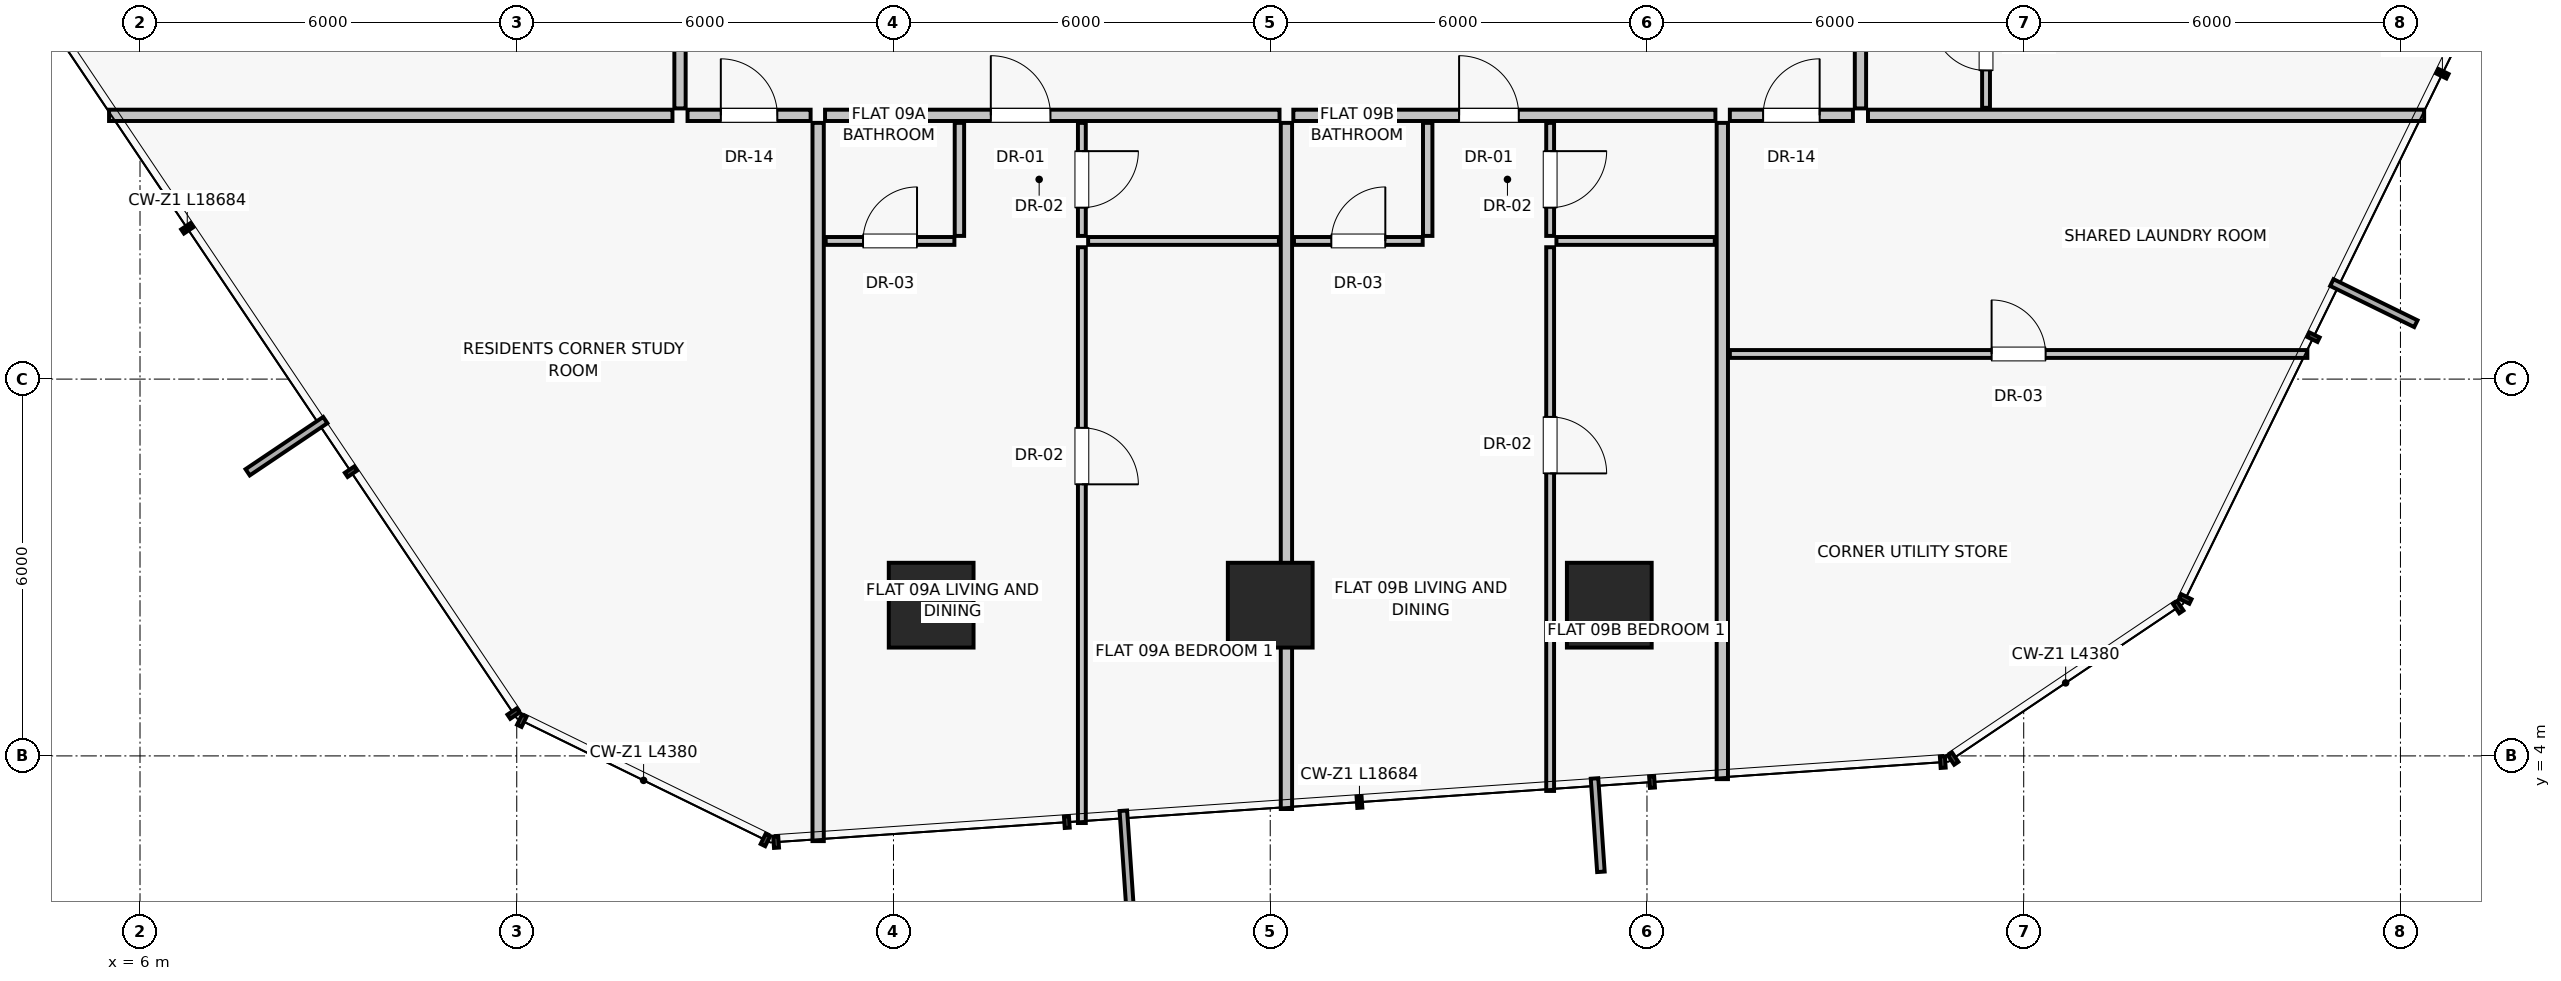
"""IFC4 building model, lengths in metres.
Left out: names, types, materials, properties, quantities, classifications, styles, units other than length and angle.
Written with IfcOpenShell. Run it as: python <this file> out.ifc"""

import sys

from ifc_helpers import new_model, si_unit, direction, frame, frame_2d, origin, origin_2d, place, context, subcontext, project, spatial, rectangle, extrude, source, transform, mapped, element, fill, save


model = new_model("IFC4")
c1 = context("Model", 3, precision=1e-05, world=origin(), true_north=direction((0.0, 1.0)))
c2 = subcontext(c1, "Body", "Model", "MODEL_VIEW")
j1 = project(units=[si_unit("LENGTHUNIT", "METRE"), si_unit("PLANEANGLEUNIT", "RADIAN")], contexts=[c1])
p1 = place(None, origin())
s1 = spatial("IfcSite", under=j1, at=p1, CompositionType="ELEMENT")
p2 = place(p1, origin())
s2 = spatial("IfcBuilding", under=s1, at=p2, CompositionType="ELEMENT")
p3 = place(p2, frame((0.0, 0.0, 37.05)))
s3 = spatial("IfcBuildingStorey", under=s2, at=p3, CompositionType="ELEMENT", Elevation=37.05)
for number, where, z_axis, x_axis in (
    (1, (18.6, 6.4, 0.0), (0.0, 0.0, 1.0), (1.0, 0.0, 0.0)),
    (2, (24.0, 6.4, 0.0), (0.0, 0.0, 1.0), (1.0, 0.0, 0.0)),
    (3, (29.4, 6.4, 0.0), (0.0, 0.0, 1.0), (1.0, 0.0, 0.0)),
):
    element("IfcColumn", number, at=place(p3, frame(where, z_axis=z_axis, x_axis=x_axis)), inside=s3, PredefinedType="COLUMN", context=c2, shape_type="SweptSolid", body=[
        extrude(rectangle(XDim=1.35, YDim=1.35, at=origin_2d()), origin(), (0.0, 0.0, 1.0), 3.25),
    ])
p4 = place(p3, frame((16.8, 14.08, 0.0), z_axis=(0.0, 0.0, 1.0), x_axis=(0.0, -1.0, 0.0)))
e4 = element("IfcWall", 4, at=p4, inside=s3, PredefinedType="PARTITIONING", context=c2, shape_type="SweptSolid", body=[
    extrude(rectangle(XDim=11.437, YDim=0.18, at=frame_2d((5.718, 0.0))), origin(), (0.0, 0.0, 1.0), 3.0),
])
p5 = place(p3, frame((31.2, 14.08, 0.0), z_axis=(0.0, 0.0, 1.0), x_axis=(0.0, -1.0, 0.0)))
e5 = element("IfcWall", 5, at=p5, inside=s3, PredefinedType="PARTITIONING", context=c2, shape_type="SweptSolid", body=[
    extrude(rectangle(XDim=10.45, YDim=0.18, at=frame_2d((5.225, 0.0))), origin(), (0.0, 0.0, 1.0), 3.0),
])
p6 = place(p3, frame((16.91, 14.2, 0.0), z_axis=(0.0, 0.0, 1.0), x_axis=(1.0, 0.0, 0.0)))
e6 = element("IfcWall", 6, at=p6, inside=s3, PredefinedType="PARTITIONING", context=c2, shape_type="SweptSolid", body=[
    extrude(rectangle(XDim=7.238, YDim=0.18, at=frame_2d((3.619, 0.0))), origin(), (0.0, 0.0, 1.0), 3.0),
])
p7 = place(p6, frame((2.64, 0.0, 0.0)))
e7 = element("IfcOpeningElement", 7, at=p7, cuts=e6, PredefinedType="OPENING", context=c2, shape_type="SweptSolid", body=[
    extrude(rectangle(XDim=0.95, YDim=2.02, at=frame_2d((0.475, 1.01))), frame((0.0, 0.1, 0.0), z_axis=(0.0, -1.0, 0.0), x_axis=(1.0, 0.0, 0.0)), (0.0, 0.0, 1.0), 0.2),
])
p8 = place(p3, frame((19.05, 14.08, 0.0), z_axis=(0.0, 0.0, 1.0), x_axis=(0.0, -1.0, 0.0)))
e8 = element("IfcWall", 8, at=p8, inside=s3, PredefinedType="PARTITIONING", context=c2, shape_type="SweptSolid", body=[
    extrude(rectangle(XDim=1.8, YDim=0.15, at=frame_2d((0.9, 0.0))), origin(), (0.0, 0.0, 1.0), 3.0),
])
p9 = place(p3, frame((16.92, 12.2, 0.0), z_axis=(0.0, 0.0, 1.0), x_axis=(1.0, 0.0, 0.0)))
e9 = element("IfcWall", 9, at=p9, inside=s3, PredefinedType="PARTITIONING", context=c2, shape_type="SweptSolid", body=[
    extrude(rectangle(XDim=2.05, YDim=0.125, at=frame_2d((1.025, 0.0))), origin(), (0.0, 0.0, 1.0), 3.0),
])
p10 = place(p9, frame((0.595, 0.0, 0.0)))
e10 = element("IfcOpeningElement", 10, at=p10, cuts=e9, PredefinedType="OPENING", context=c2, shape_type="SweptSolid", body=[
    extrude(rectangle(XDim=0.86, YDim=2.01, at=frame_2d((0.43, 1.005))), frame((0.0, 0.073, 0.0), z_axis=(0.0, -1.0, 0.0), x_axis=(1.0, 0.0, 0.0)), (0.0, 0.0, 1.0), 0.145),
])
p11 = place(p3, frame((21.0, 14.08, 0.0), z_axis=(0.0, 0.0, 1.0), x_axis=(0.0, -1.0, 0.0)))
e11 = element("IfcWall", 11, at=p11, inside=s3, PredefinedType="PARTITIONING", context=c2, shape_type="SweptSolid", body=[
    extrude(rectangle(XDim=1.8, YDim=0.125, at=frame_2d((0.9, 0.0))), origin(), (0.0, 0.0, 1.0), 3.0),
])
p12 = place(p11, frame((0.45, 0.0, 0.0)))
e12 = element("IfcOpeningElement", 12, at=p12, cuts=e11, PredefinedType="OPENING", context=c2, shape_type="SweptSolid", body=[
    extrude(rectangle(XDim=0.9, YDim=2.01, at=frame_2d((0.45, 1.005))), frame((0.0, 0.073, 0.0), z_axis=(0.0, -1.0, 0.0), x_axis=(1.0, 0.0, 0.0)), (0.0, 0.0, 1.0), 0.145),
])
p13 = place(p3, frame((21.1, 12.2, 0.0), z_axis=(0.0, 0.0, 1.0), x_axis=(1.0, 0.0, 0.0)))
e13 = element("IfcWall", 13, at=p13, inside=s3, PredefinedType="PARTITIONING", context=c2, shape_type="SweptSolid", body=[
    extrude(rectangle(XDim=3.038, YDim=0.125, at=frame_2d((1.519, 0.0))), origin(), (0.0, 0.0, 1.0), 3.0),
])
p14 = place(p3, frame((21.0, 12.1, 0.0), z_axis=(0.0, 0.0, 1.0), x_axis=(0.0, -1.0, 0.0)))
e14 = element("IfcWall", 14, at=p14, inside=s3, PredefinedType="PARTITIONING", context=c2, shape_type="SweptSolid", body=[
    extrude(rectangle(XDim=9.169, YDim=0.125, at=frame_2d((4.584, 0.0))), origin(), (0.0, 0.0, 1.0), 3.0),
])
p15 = place(p14, frame((2.875, 0.0, 0.0)))
e15 = element("IfcOpeningElement", 15, at=p15, cuts=e14, PredefinedType="OPENING", context=c2, shape_type="SweptSolid", body=[
    extrude(rectangle(XDim=0.9, YDim=2.01, at=frame_2d((0.45, 1.005))), frame((0.0, 0.073, 0.0), z_axis=(0.0, -1.0, 0.0), x_axis=(1.0, 0.0, 0.0)), (0.0, 0.0, 1.0), 0.145),
])
p16 = place(p3, frame((24.258, 14.08, 0.0), z_axis=(0.0, 0.0, 1.0), x_axis=(0.0, -1.0, 0.0)))
e16 = element("IfcWall", 16, at=p16, inside=s3, PredefinedType="PARTITIONING", context=c2, shape_type="SweptSolid", body=[
    extrude(rectangle(XDim=10.926, YDim=0.18, at=frame_2d((5.463, 0.0))), origin(), (0.0, 0.0, 1.0), 3.0),
])
p17 = place(p3, frame((24.368, 14.2, 0.0), z_axis=(0.0, 0.0, 1.0), x_axis=(1.0, 0.0, 0.0)))
e17 = element("IfcWall", 17, at=p17, inside=s3, PredefinedType="PARTITIONING", context=c2, shape_type="SweptSolid", body=[
    extrude(rectangle(XDim=6.722, YDim=0.18, at=frame_2d((3.361, 0.0))), origin(), (0.0, 0.0, 1.0), 3.0),
])
p18 = place(p17, frame((2.64, 0.0, 0.0)))
e18 = element("IfcOpeningElement", 18, at=p18, cuts=e17, PredefinedType="OPENING", context=c2, shape_type="SweptSolid", body=[
    extrude(rectangle(XDim=0.95, YDim=2.02, at=frame_2d((0.475, 1.01))), frame((0.0, 0.1, 0.0), z_axis=(0.0, -1.0, 0.0), x_axis=(1.0, 0.0, 0.0)), (0.0, 0.0, 1.0), 0.2),
])
p19 = place(p3, frame((26.508, 14.08, 0.0), z_axis=(0.0, 0.0, 1.0), x_axis=(0.0, -1.0, 0.0)))
e19 = element("IfcWall", 19, at=p19, inside=s3, PredefinedType="PARTITIONING", context=c2, shape_type="SweptSolid", body=[
    extrude(rectangle(XDim=1.8, YDim=0.15, at=frame_2d((0.9, 0.0))), origin(), (0.0, 0.0, 1.0), 3.0),
])
p20 = place(p3, frame((24.378, 12.2, 0.0), z_axis=(0.0, 0.0, 1.0), x_axis=(1.0, 0.0, 0.0)))
e20 = element("IfcWall", 20, at=p20, inside=s3, PredefinedType="PARTITIONING", context=c2, shape_type="SweptSolid", body=[
    extrude(rectangle(XDim=2.05, YDim=0.125, at=frame_2d((1.025, 0.0))), origin(), (0.0, 0.0, 1.0), 3.0),
])
p21 = place(p20, frame((0.595, 0.0, 0.0)))
e21 = element("IfcOpeningElement", 21, at=p21, cuts=e20, PredefinedType="OPENING", context=c2, shape_type="SweptSolid", body=[
    extrude(rectangle(XDim=0.86, YDim=2.01, at=frame_2d((0.43, 1.005))), frame((0.0, 0.073, 0.0), z_axis=(0.0, -1.0, 0.0), x_axis=(1.0, 0.0, 0.0)), (0.0, 0.0, 1.0), 0.145),
])
p22 = place(p3, frame((28.458, 14.08, 0.0), z_axis=(0.0, 0.0, 1.0), x_axis=(0.0, -1.0, 0.0)))
e22 = element("IfcWall", 22, at=p22, inside=s3, PredefinedType="PARTITIONING", context=c2, shape_type="SweptSolid", body=[
    extrude(rectangle(XDim=1.8, YDim=0.125, at=frame_2d((0.9, 0.0))), origin(), (0.0, 0.0, 1.0), 3.0),
])
p23 = place(p22, frame((0.45, 0.0, 0.0)))
e23 = element("IfcOpeningElement", 23, at=p23, cuts=e22, PredefinedType="OPENING", context=c2, shape_type="SweptSolid", body=[
    extrude(rectangle(XDim=0.9, YDim=2.01, at=frame_2d((0.45, 1.005))), frame((0.0, 0.073, 0.0), z_axis=(0.0, -1.0, 0.0), x_axis=(1.0, 0.0, 0.0)), (0.0, 0.0, 1.0), 0.145),
])
p24 = place(p3, frame((28.558, 12.2, 0.0), z_axis=(0.0, 0.0, 1.0), x_axis=(1.0, 0.0, 0.0)))
e24 = element("IfcWall", 24, at=p24, inside=s3, PredefinedType="PARTITIONING", context=c2, shape_type="SweptSolid", body=[
    extrude(rectangle(XDim=2.522, YDim=0.125, at=frame_2d((1.261, 0.0))), origin(), (0.0, 0.0, 1.0), 3.0),
])
p25 = place(p3, frame((28.458, 12.1, 0.0), z_axis=(0.0, 0.0, 1.0), x_axis=(0.0, -1.0, 0.0)))
e25 = element("IfcWall", 25, at=p25, inside=s3, PredefinedType="PARTITIONING", context=c2, shape_type="SweptSolid", body=[
    extrude(rectangle(XDim=8.658, YDim=0.125, at=frame_2d((4.329, 0.0))), origin(), (0.0, 0.0, 1.0), 3.0),
])
p26 = place(p25, frame((2.702, 0.0, 0.0)))
e26 = element("IfcOpeningElement", 26, at=p26, cuts=e25, PredefinedType="OPENING", context=c2, shape_type="SweptSolid", body=[
    extrude(rectangle(XDim=0.9, YDim=2.01, at=frame_2d((0.45, 1.005))), frame((0.0, 0.073, 0.0), z_axis=(0.0, -1.0, 0.0), x_axis=(1.0, 0.0, 0.0)), (0.0, 0.0, 1.0), 0.145),
])
p27 = place(p3, frame((14.48, 14.2, 0.0), z_axis=(0.0, 0.0, 1.0), x_axis=(-1.0, 0.0, 0.0)))
e27 = element("IfcWall", 27, at=p27, inside=s3, PredefinedType="PARTITIONING", context=c2, shape_type="SweptSolid", body=[
    extrude(rectangle(XDim=8.973, YDim=0.18, at=frame_2d((4.486, 0.0))), origin(), (0.0, 0.0, 1.0), 3.0),
])
p28 = place(p3, frame((14.6, 14.31, 0.0), z_axis=(0.0, 0.0, 1.0), x_axis=(0.0, 1.0, 0.0)))
e28 = element("IfcWall", 28, at=p28, inside=s3, PredefinedType="PARTITIONING", context=c2, shape_type="SweptSolid", body=[
    extrude(rectangle(XDim=3.697, YDim=0.18, at=frame_2d((1.849, 0.0))), origin(), (0.0, 0.0, 1.0), 3.0),
])
p29 = place(p28, frame((1.348, 0.0, 0.0)))
e29 = element("IfcOpeningElement", 29, at=p29, cuts=e28, PredefinedType="OPENING", context=c2, shape_type="SweptSolid", body=[
    extrude(rectangle(XDim=1.0, YDim=2.01, at=frame_2d((0.5, 1.005))), frame((0.0, 0.1, 0.0), z_axis=(0.0, -1.0, 0.0), x_axis=(1.0, 0.0, 0.0)), (0.0, 0.0, 1.0), 0.2),
])
p30 = place(p3, frame((33.52, 14.2, 0.0), z_axis=(0.0, 0.0, 1.0), x_axis=(1.0, 0.0, 0.0)))
e30 = element("IfcWall", 30, at=p30, inside=s3, PredefinedType="PARTITIONING", context=c2, shape_type="SweptSolid", body=[
    extrude(rectangle(XDim=8.857, YDim=0.18, at=frame_2d((4.429, 0.0))), origin(), (0.0, 0.0, 1.0), 3.0),
])
p31 = place(p3, frame((33.4, 14.31, 0.0), z_axis=(0.0, 0.0, 1.0), x_axis=(0.0, 1.0, 0.0)))
e31 = element("IfcWall", 31, at=p31, inside=s3, PredefinedType="PARTITIONING", context=c2, shape_type="SweptSolid", body=[
    extrude(rectangle(XDim=10.088, YDim=0.18, at=frame_2d((5.044, 0.0))), origin(), (0.0, 0.0, 1.0), 3.0),
])
p32 = place(p31, frame((3.426, 0.0, 0.0)))
e32 = element("IfcOpeningElement", 32, at=p32, cuts=e31, PredefinedType="OPENING", context=c2, shape_type="SweptSolid", body=[
    extrude(rectangle(XDim=0.95, YDim=2.02, at=frame_2d((0.475, 1.01))), frame((0.0, 0.1, 0.0), z_axis=(0.0, -1.0, 0.0), x_axis=(1.0, 0.0, 0.0)), (0.0, 0.0, 1.0), 0.2),
])
p33 = place(p3, frame((35.4, 14.32, 0.0), z_axis=(0.0, 0.0, 1.0), x_axis=(0.0, 1.0, 0.0)))
e33 = element("IfcWall", 33, at=p33, inside=s3, PredefinedType="PARTITIONING", context=c2, shape_type="SweptSolid", body=[
    extrude(rectangle(XDim=2.05, YDim=0.125, at=frame_2d((1.025, 0.0))), origin(), (0.0, 0.0, 1.0), 3.0),
])
p34 = place(p33, frame((0.595, 0.0, 0.0)))
e34 = element("IfcOpeningElement", 34, at=p34, cuts=e33, PredefinedType="OPENING", context=c2, shape_type="SweptSolid", body=[
    extrude(rectangle(XDim=0.86, YDim=2.01, at=frame_2d((0.43, 1.005))), frame((0.0, 0.073, 0.0), z_axis=(0.0, -1.0, 0.0), x_axis=(1.0, 0.0, 0.0)), (0.0, 0.0, 1.0), 0.145),
])
p35 = place(p3, frame((14.72, 14.2, 0.0), z_axis=(0.0, 0.0, 1.0), x_axis=(1.0, 0.0, 0.0)))
e35 = element("IfcWall", 35, at=p35, inside=s3, PredefinedType="PARTITIONING", context=c2, shape_type="SweptSolid", body=[
    extrude(rectangle(XDim=1.96, YDim=0.18, at=frame_2d((0.98, 0.0))), origin(), (0.0, 0.0, 1.0), 3.0),
])
p36 = place(p35, frame((0.53, 0.0, 0.0)))
e36 = element("IfcOpeningElement", 36, at=p36, cuts=e35, PredefinedType="OPENING", context=c2, shape_type="SweptSolid", body=[
    extrude(rectangle(XDim=0.9, YDim=2.01, at=frame_2d((0.45, 1.005))), frame((0.0, 0.1, 0.0), z_axis=(0.0, -1.0, 0.0), x_axis=(1.0, 0.0, 0.0)), (0.0, 0.0, 1.0), 0.2),
])
p37 = place(p3, frame((31.32, 14.2, 0.0), z_axis=(0.0, 0.0, 1.0), x_axis=(1.0, 0.0, 0.0)))
e37 = element("IfcWall", 37, at=p37, inside=s3, PredefinedType="PARTITIONING", context=c2, shape_type="SweptSolid", body=[
    extrude(rectangle(XDim=1.96, YDim=0.18, at=frame_2d((0.98, 0.0))), origin(), (0.0, 0.0, 1.0), 3.0),
])
p38 = place(p37, frame((0.53, 0.0, 0.0)))
e38 = element("IfcOpeningElement", 38, at=p38, cuts=e37, PredefinedType="OPENING", context=c2, shape_type="SweptSolid", body=[
    extrude(rectangle(XDim=0.9, YDim=2.01, at=frame_2d((0.45, 1.005))), frame((0.0, 0.1, 0.0), z_axis=(0.0, -1.0, 0.0), x_axis=(1.0, 0.0, 0.0)), (0.0, 0.0, 1.0), 0.2),
])
p39 = place(p3, frame((31.32, 10.4, 0.0), z_axis=(0.0, 0.0, 1.0), x_axis=(1.0, 0.0, 0.0)))
e39 = element("IfcWall", 39, at=p39, inside=s3, PredefinedType="PARTITIONING", context=c2, shape_type="SweptSolid", body=[
    extrude(rectangle(XDim=9.198, YDim=0.125, at=frame_2d((4.599, 0.0))), origin(), (0.0, 0.0, 1.0), 3.0),
])
p40 = place(p39, frame((4.169, 0.0, 0.0)))
e40 = element("IfcOpeningElement", 40, at=p40, cuts=e39, PredefinedType="OPENING", context=c2, shape_type="SweptSolid", body=[
    extrude(rectangle(XDim=0.86, YDim=2.01, at=frame_2d((0.43, 1.005))), frame((0.0, 0.073, 0.0), z_axis=(0.0, -1.0, 0.0), x_axis=(1.0, 0.0, 0.0)), (0.0, 0.0, 1.0), 0.145),
])
m1 = source(origin(), c2, "Body", "SweptSolid", [
    extrude(rectangle(XDim=0.95, YDim=2.02, at=frame_2d((0.475, 1.01))), frame((0.0, 0.025, 0.0), z_axis=(0.0, -1.0, 0.0), x_axis=(1.0, 0.0, 0.0)), (0.0, 0.0, 1.0), 0.05),
])
p41 = place(p7, origin())
e41 = element("IfcDoor", 41, at=p41, inside=s3, OperationType="SINGLE_SWING_LEFT", PredefinedType="DOOR", context=c2, shape_type="MappedRepresentation", body=[
    mapped(m1, transform((0.0, 0.0, 0.0), scale=1.0)),
])
fill(e7, e41)
m2 = source(origin(), c2, "Body", "SweptSolid", [
    extrude(rectangle(XDim=0.86, YDim=2.01, at=frame_2d((0.43, 1.005))), frame((0.0, 0.025, 0.0), z_axis=(0.0, -1.0, 0.0), x_axis=(1.0, 0.0, 0.0)), (0.0, 0.0, 1.0), 0.05),
])
p42 = place(p10, origin())
e42 = element("IfcDoor", 42, at=p42, inside=s3, OperationType="SINGLE_SWING_RIGHT", PredefinedType="DOOR", context=c2, shape_type="MappedRepresentation", body=[
    mapped(m2, transform((0.0, 0.0, 0.0), scale=1.0)),
])
fill(e10, e42)
m3 = source(origin(), c2, "Body", "SweptSolid", [
    extrude(rectangle(XDim=0.9, YDim=2.01, at=frame_2d((0.45, 1.005))), frame((0.0, 0.025, 0.0), z_axis=(0.0, -1.0, 0.0), x_axis=(1.0, 0.0, 0.0)), (0.0, 0.0, 1.0), 0.05),
])
p43 = place(p12, origin())
e43 = element("IfcDoor", 43, at=p43, inside=s3, OperationType="SINGLE_SWING_LEFT", PredefinedType="DOOR", context=c2, shape_type="MappedRepresentation", body=[
    mapped(m3, transform((0.0, 0.0, 0.0), scale=1.0)),
])
fill(e12, e43)
p44 = place(p15, origin())
e44 = element("IfcDoor", 44, at=p44, inside=s3, OperationType="SINGLE_SWING_RIGHT", PredefinedType="DOOR", context=c2, shape_type="MappedRepresentation", body=[
    mapped(m3, transform((0.0, 0.0, 0.0), scale=1.0)),
])
fill(e15, e44)
p45 = place(p18, origin())
e45 = element("IfcDoor", 45, at=p45, inside=s3, OperationType="SINGLE_SWING_LEFT", PredefinedType="DOOR", context=c2, shape_type="MappedRepresentation", body=[
    mapped(m1, transform((0.0, 0.0, 0.0), scale=1.0)),
])
fill(e18, e45)
p46 = place(p21, origin())
e46 = element("IfcDoor", 46, at=p46, inside=s3, OperationType="SINGLE_SWING_RIGHT", PredefinedType="DOOR", context=c2, shape_type="MappedRepresentation", body=[
    mapped(m2, transform((0.0, 0.0, 0.0), scale=1.0)),
])
fill(e21, e46)
p47 = place(p23, origin())
e47 = element("IfcDoor", 47, at=p47, inside=s3, OperationType="SINGLE_SWING_LEFT", PredefinedType="DOOR", context=c2, shape_type="MappedRepresentation", body=[
    mapped(m3, transform((0.0, 0.0, 0.0), scale=1.0)),
])
fill(e23, e47)
p48 = place(p26, origin())
e48 = element("IfcDoor", 48, at=p48, inside=s3, OperationType="SINGLE_SWING_RIGHT", PredefinedType="DOOR", context=c2, shape_type="MappedRepresentation", body=[
    mapped(m3, transform((0.0, 0.0, 0.0), scale=1.0)),
])
fill(e26, e48)
p49 = place(p34, origin())
e49 = element("IfcDoor", 49, at=p49, inside=s3, OperationType="SINGLE_SWING_RIGHT", PredefinedType="DOOR", context=c2, shape_type="MappedRepresentation", body=[
    mapped(m2, transform((0.0, 0.0, 0.0), scale=1.0)),
])
fill(e34, e49)
p50 = place(p36, origin())
e50 = element("IfcDoor", 50, at=p50, inside=s3, OperationType="SINGLE_SWING_LEFT", PredefinedType="DOOR", context=c2, shape_type="MappedRepresentation", body=[
    mapped(m3, transform((0.0, 0.0, 0.0), scale=1.0)),
])
fill(e36, e50)
p51 = place(p38, origin())
e51 = element("IfcDoor", 51, at=p51, inside=s3, OperationType="SINGLE_SWING_RIGHT", PredefinedType="DOOR", context=c2, shape_type="MappedRepresentation", body=[
    mapped(m3, transform((0.0, 0.0, 0.0), scale=1.0)),
])
fill(e38, e51)
p52 = place(p40, origin())
e52 = element("IfcDoor", 52, at=p52, inside=s3, OperationType="SINGLE_SWING_LEFT", PredefinedType="DOOR", context=c2, shape_type="MappedRepresentation", body=[
    mapped(m2, transform((0.0, 0.0, 0.0), scale=1.0)),
])
fill(e40, e52)
save(model, sys.argv[1])
